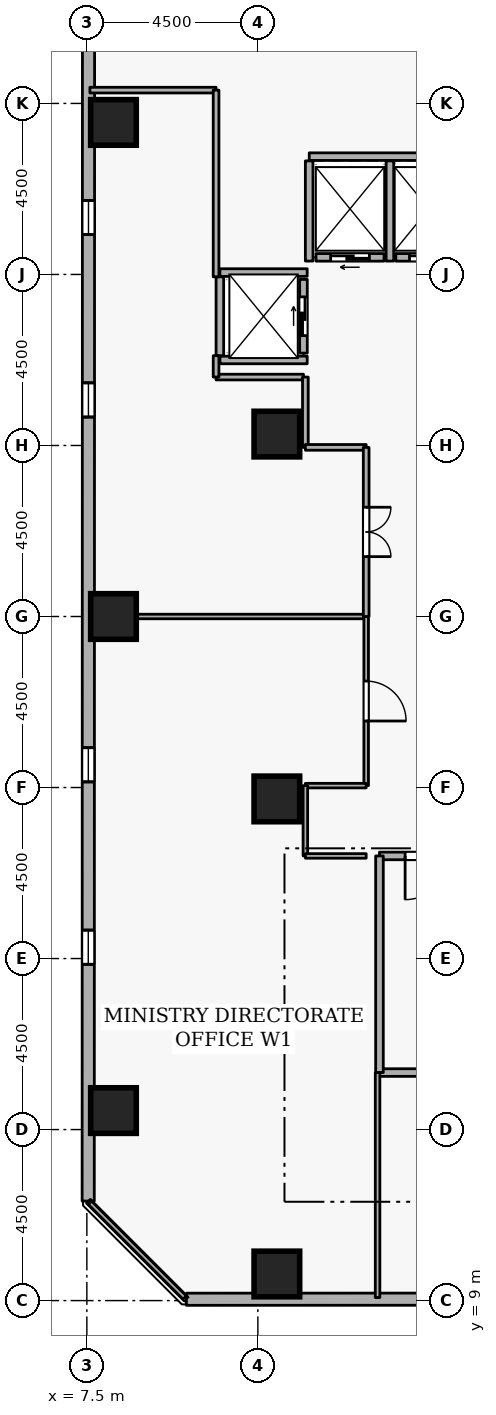
"""IFC4 building model, lengths in metres.
Left out: names, types, materials, properties, quantities, classifications, styles, units other than length and angle.
Written with IfcOpenShell. Run it as: python <this file> out.ifc"""

import sys

from ifc_helpers import new_model, si_unit, direction, frame, frame_2d, origin, origin_2d, place, context, subcontext, project, spatial, rectangle, extrude, element, fill, save


model = new_model("IFC4")
c1 = context("Model", 3, precision=1e-05, world=origin(), true_north=direction((0.0, 1.0)))
c2 = subcontext(c1, "Body", "Model", "MODEL_VIEW")
j1 = project(units=[si_unit("LENGTHUNIT", "METRE"), si_unit("PLANEANGLEUNIT", "RADIAN")], contexts=[c1])
p1 = place(None, origin())
s1 = spatial("IfcSite", under=j1, at=p1, CompositionType="ELEMENT")
p2 = place(p1, origin())
s2 = spatial("IfcBuilding", under=s1, at=p2, CompositionType="ELEMENT")
p3 = place(p2, frame((0.0, 0.0, 83.7)))
s3 = spatial("IfcBuildingStorey", under=s2, at=p3, CompositionType="ELEMENT", Elevation=83.7)
for number, where, z_axis, x_axis in (
    (1, (12.5, 9.7, 0.0), (0.0, 0.0, 1.0), (1.0, 0.0, 0.0)),
    (2, (8.2, 14.0, 0.0), (0.0, 0.0, 1.0), (1.0, 0.0, 0.0)),
    (3, (8.2, 27.0, 0.0), (0.0, 0.0, 1.0), (1.0, 0.0, 0.0)),
    (4, (8.2, 40.0, 0.0), (0.0, 0.0, 1.0), (1.0, 0.0, 0.0)),
    (5, (12.5, 22.2, 0.0), (0.0, 0.0, 1.0), (1.0, 0.0, 0.0)),
    (6, (12.5, 31.8, 0.0), (0.0, 0.0, 1.0), (1.0, 0.0, 0.0)),
):
    element("IfcColumn", number, at=place(p3, frame(where, z_axis=z_axis, x_axis=x_axis)), inside=s3, PredefinedType="COLUMN", context=c2, shape_type="SweptSolid", body=[
        extrude(rectangle(XDim=1.2, YDim=1.2, at=origin_2d()), origin(), (0.0, 0.0, 1.0), 3.6),
    ])
p4 = place(p3, frame((10.119, 9.035, 0.0), z_axis=(0.0, 0.0, 1.0), x_axis=(0.999999960392, 0.000281454314, 0.0)))
e7 = element("IfcWall", 7, at=p4, inside=s3, PredefinedType="STANDARD", context=c2, shape_type="SweptSolid", body=[
    extrude(rectangle(XDim=33.83, YDim=0.32, at=frame_2d((16.915, 0.0))), origin(), (0.0, 0.0, 1.0), 2.7),
])
p5 = place(p4, frame((7.5, 0.0, 0.72)))
e8 = element("IfcOpeningElement", 8, at=p5, cuts=e7, PredefinedType="OPENING", context=c2, shape_type="SweptSolid", body=[
    extrude(rectangle(XDim=0.9, YDim=1.75, at=frame_2d((0.45, 0.875))), frame((0.0, 0.17, 0.0), z_axis=(0.0, -1.0, 0.0), x_axis=(1.0, 0.0, 0.0)), (0.0, 0.0, 1.0), 0.34),
])
p6 = place(p4, frame((12.3, 0.0, 0.72)))
e9 = element("IfcOpeningElement", 9, at=p6, cuts=e7, PredefinedType="OPENING", context=c2, shape_type="SweptSolid", body=[
    extrude(rectangle(XDim=0.9, YDim=1.75, at=frame_2d((0.45, 0.875))), frame((0.0, 0.17, 0.0), z_axis=(0.0, -1.0, 0.0), x_axis=(1.0, 0.0, 0.0)), (0.0, 0.0, 1.0), 0.34),
])
p7 = place(p4, frame((17.1, 0.0, 0.72)))
e10 = element("IfcOpeningElement", 10, at=p7, cuts=e7, PredefinedType="OPENING", context=c2, shape_type="SweptSolid", body=[
    extrude(rectangle(XDim=0.9, YDim=1.75, at=frame_2d((0.45, 0.875))), frame((0.0, 0.17, 0.0), z_axis=(0.0, -1.0, 0.0), x_axis=(1.0, 0.0, 0.0)), (0.0, 0.0, 1.0), 0.34),
])
p8 = place(p4, frame((21.9, 0.0, 0.72)))
e11 = element("IfcOpeningElement", 11, at=p8, cuts=e7, PredefinedType="OPENING", context=c2, shape_type="SweptSolid", body=[
    extrude(rectangle(XDim=0.9, YDim=1.75, at=frame_2d((0.45, 0.875))), frame((0.0, 0.17, 0.0), z_axis=(0.0, -1.0, 0.0), x_axis=(1.0, 0.0, 0.0)), (0.0, 0.0, 1.0), 0.34),
])
p9 = place(p3, frame((7.545, 45.448, 0.0), z_axis=(0.0, 0.0, 1.0), x_axis=(-0.000281454314, -0.999999960392, 0.0)))
e12 = element("IfcWall", 12, at=p9, inside=s3, PredefinedType="STANDARD", context=c2, shape_type="SweptSolid", body=[
    extrude(rectangle(XDim=33.83, YDim=0.32, at=frame_2d((16.915, 0.0))), origin(), (0.0, 0.0, 1.0), 2.7),
])
p10 = place(p9, frame((7.5, 0.0, 0.72)))
e13 = element("IfcOpeningElement", 13, at=p10, cuts=e12, PredefinedType="OPENING", context=c2, shape_type="SweptSolid", body=[
    extrude(rectangle(XDim=0.9, YDim=1.75, at=frame_2d((0.45, 0.875))), frame((0.0, 0.17, 0.0), z_axis=(0.0, -1.0, 0.0), x_axis=(1.0, 0.0, 0.0)), (0.0, 0.0, 1.0), 0.34),
])
p11 = place(p9, frame((12.3, 0.0, 0.72)))
e14 = element("IfcOpeningElement", 14, at=p11, cuts=e12, PredefinedType="OPENING", context=c2, shape_type="SweptSolid", body=[
    extrude(rectangle(XDim=0.9, YDim=1.75, at=frame_2d((0.45, 0.875))), frame((0.0, 0.17, 0.0), z_axis=(0.0, -1.0, 0.0), x_axis=(1.0, 0.0, 0.0)), (0.0, 0.0, 1.0), 0.34),
])
p12 = place(p9, frame((21.9, 0.0, 0.72)))
e15 = element("IfcOpeningElement", 15, at=p12, cuts=e12, PredefinedType="OPENING", context=c2, shape_type="SweptSolid", body=[
    extrude(rectangle(XDim=0.9, YDim=1.75, at=frame_2d((0.45, 0.875))), frame((0.0, 0.17, 0.0), z_axis=(0.0, -1.0, 0.0), x_axis=(1.0, 0.0, 0.0)), (0.0, 0.0, 1.0), 0.34),
])
p13 = place(p9, frame((26.7, 0.0, 0.72)))
e16 = element("IfcOpeningElement", 16, at=p13, cuts=e12, PredefinedType="OPENING", context=c2, shape_type="SweptSolid", body=[
    extrude(rectangle(XDim=0.9, YDim=1.75, at=frame_2d((0.45, 0.875))), frame((0.0, 0.17, 0.0), z_axis=(0.0, -1.0, 0.0), x_axis=(1.0, 0.0, 0.0)), (0.0, 0.0, 1.0), 0.34),
])
p14 = place(p3, frame((17.37, 36.45, 0.0), z_axis=(0.0, 0.0, 1.0), x_axis=(-1.0, 0.0, 0.0)))
e17 = element("IfcWall", 17, at=p14, inside=s3, PredefinedType="STANDARD", context=c2, shape_type="SweptSolid", body=[
    extrude(rectangle(XDim=1.74, YDim=0.2, at=frame_2d((0.87, 0.0))), origin(), (0.0, 0.0, 1.0), 3.34),
])
p15 = place(p14, frame((0.36, 0.0, 0.0)))
e18 = element("IfcOpeningElement", 18, at=p15, cuts=e17, PredefinedType="OPENING", context=c2, shape_type="SweptSolid", body=[
    extrude(rectangle(XDim=1.02, YDim=2.06, at=frame_2d((0.51, 1.03))), frame((0.0, 0.11, 0.0), z_axis=(0.0, -1.0, 0.0), x_axis=(1.0, 0.0, 0.0)), (0.0, 0.0, 1.0), 0.22),
])
p16 = place(p3, frame((15.32, 36.45, 0.0), z_axis=(0.0, 0.0, 1.0), x_axis=(-1.0, 0.0, 0.0)))
e19 = element("IfcWall", 19, at=p16, inside=s3, PredefinedType="STANDARD", context=c2, shape_type="SweptSolid", body=[
    extrude(rectangle(XDim=1.79, YDim=0.2, at=frame_2d((0.895, 0.0))), origin(), (0.0, 0.0, 1.0), 3.34),
])
p17 = place(p16, frame((0.385, 0.0, 0.0)))
e20 = element("IfcOpeningElement", 20, at=p17, cuts=e19, PredefinedType="OPENING", context=c2, shape_type="SweptSolid", body=[
    extrude(rectangle(XDim=1.02, YDim=2.06, at=frame_2d((0.51, 1.03))), frame((0.0, 0.11, 0.0), z_axis=(0.0, -1.0, 0.0), x_axis=(1.0, 0.0, 0.0)), (0.0, 0.0, 1.0), 0.22),
])
p18 = place(p3, frame((13.2, 33.93, 0.0), z_axis=(0.0, 0.0, 1.0), x_axis=(0.0, 1.0, 0.0)))
e21 = element("IfcWall", 21, at=p18, inside=s3, PredefinedType="STANDARD", context=c2, shape_type="SweptSolid", body=[
    extrude(rectangle(XDim=1.94, YDim=0.2, at=frame_2d((0.97, 0.0))), origin(), (0.0, 0.0, 1.0), 3.34),
])
p19 = place(p18, frame((0.46, 0.0, 0.0)))
e22 = element("IfcOpeningElement", 22, at=p19, cuts=e21, PredefinedType="OPENING", context=c2, shape_type="SweptSolid", body=[
    extrude(rectangle(XDim=1.02, YDim=2.06, at=frame_2d((0.51, 1.03))), frame((0.0, 0.11, 0.0), z_axis=(0.0, -1.0, 0.0), x_axis=(1.0, 0.0, 0.0)), (0.0, 0.0, 1.0), 0.22),
])
p20 = place(p3, frame((13.352, 39.1, 0.0), z_axis=(0.0, 0.0, 1.0), x_axis=(1.0, 0.0, 0.0)))
e23 = element("IfcWall", 23, at=p20, inside=s3, PredefinedType="STANDARD", context=c2, shape_type="SweptSolid", body=[
    extrude(rectangle(XDim=4.196, YDim=0.2, at=frame_2d((2.098, 0.0))), origin(), (0.0, 0.0, 1.0), 3.34),
])
for number, where, z_axis, x_axis in (
    (24, (15.475, 36.352, 0.0), (0.0, 0.0, 1.0), (0.0, 1.0, 0.0)),
    (25, (13.35, 36.352, 0.0), (0.0, 0.0, 1.0), (0.0, 1.0, 0.0)),
):
    element("IfcWall", number, at=place(p3, frame(where, z_axis=z_axis, x_axis=x_axis)), inside=s3, PredefinedType="STANDARD", context=c2, shape_type="SweptSolid", body=[
        extrude(rectangle(XDim=2.636, YDim=0.2, at=frame_2d((1.318, 0.0))), origin(), (0.0, 0.0, 1.0), 3.34),
    ])
for number, where, z_axis, x_axis in (
    (26, (11.002, 36.05, 0.0), (0.0, 0.0, 1.0), (1.0, 0.0, 0.0)),
    (27, (11.002, 33.75, 0.0), (0.0, 0.0, 1.0), (1.0, 0.0, 0.0)),
):
    element("IfcWall", number, at=place(p3, frame(where, z_axis=z_axis, x_axis=x_axis)), inside=s3, PredefinedType="STANDARD", context=c2, shape_type="SweptSolid", body=[
        extrude(rectangle(XDim=2.296, YDim=0.2, at=frame_2d((1.148, 0.0))), origin(), (0.0, 0.0, 1.0), 3.34),
    ])
p21 = place(p3, frame((11.0, 33.862, 0.0), z_axis=(0.0, 0.0, 1.0), x_axis=(0.0, 1.0, 0.0)))
e28 = element("IfcWall", 28, at=p21, inside=s3, PredefinedType="STANDARD", context=c2, shape_type="SweptSolid", body=[
    extrude(rectangle(XDim=2.076, YDim=0.2, at=frame_2d((1.038, 0.0))), origin(), (0.0, 0.0, 1.0), 3.34),
])
p22 = place(p3, frame((15.2, 15.0, 0.0), z_axis=(0.0, 0.0, 1.0), x_axis=(1.0, 0.0, 0.0)))
e29 = element("IfcWall", 29, at=p22, inside=s3, PredefinedType="STANDARD", context=c2, shape_type="SweptSolid", body=[
    extrude(rectangle(XDim=2.5, YDim=0.2, at=frame_2d((1.25, 0.0))), origin(), (0.0, 0.0, 1.0), 3.34),
])
p23 = place(p3, frame((17.7, 20.7, 0.0), z_axis=(0.0, 0.0, 1.0), x_axis=(-1.0, 0.0, 0.0)))
e30 = element("IfcWall", 30, at=p23, inside=s3, PredefinedType="STANDARD", context=c2, shape_type="SweptSolid", body=[
    extrude(rectangle(XDim=2.5, YDim=0.2, at=frame_2d((1.25, 0.0))), origin(), (0.0, 0.0, 1.0), 3.34),
])
p24 = place(p23, frame((0.675, 0.0, 0.0)))
e31 = element("IfcOpeningElement", 31, at=p24, cuts=e30, PredefinedType="OPENING", context=c2, shape_type="SweptSolid", body=[
    extrude(rectangle(XDim=1.15, YDim=2.1, at=frame_2d((0.575, 1.05))), frame((0.0, 0.11, 0.0), z_axis=(0.0, -1.0, 0.0), x_axis=(1.0, 0.0, 0.0)), (0.0, 0.0, 1.0), 0.22),
])
p25 = place(p3, frame((15.2, 20.7, 0.0), z_axis=(0.0, 0.0, 1.0), x_axis=(0.0, -1.0, 0.0)))
e32 = element("IfcWall", 32, at=p25, inside=s3, PredefinedType="STANDARD", context=c2, shape_type="SweptSolid", body=[
    extrude(rectangle(XDim=5.7, YDim=0.2, at=frame_2d((2.85, 0.0))), origin(), (0.0, 0.0, 1.0), 3.34),
])
p26 = place(p3, frame((7.58, 27.0, 0.0), z_axis=(0.0, 0.0, 1.0), x_axis=(1.0, 0.0, 0.0)))
e33 = element("IfcWall", 33, at=p26, inside=s3, PredefinedType="PARTITIONING", context=c2, shape_type="SweptSolid", body=[
    extrude(rectangle(XDim=7.27, YDim=0.12, at=frame_2d((3.635, 0.0))), origin(), (0.0, 0.0, 1.0), 2.882),
])
p27 = place(p3, frame((14.85, 27.0, 0.0), z_axis=(0.0, 0.0, 1.0), x_axis=(0.0, -1.0, 0.0)))
e34 = element("IfcWall", 34, at=p27, inside=s3, PredefinedType="PARTITIONING", context=c2, shape_type="SweptSolid", body=[
    extrude(rectangle(XDim=4.45, YDim=0.12, at=frame_2d((2.225, 0.0))), origin(), (0.0, 0.0, 1.0), 3.34),
])
p28 = place(p27, frame((1.7, 0.0, 0.0)))
e35 = element("IfcOpeningElement", 35, at=p28, cuts=e34, PredefinedType="OPENING", context=c2, shape_type="SweptSolid", body=[
    extrude(rectangle(XDim=1.05, YDim=2.1, at=frame_2d((0.525, 1.05))), frame((0.0, 0.07, 0.0), z_axis=(0.0, -1.0, 0.0), x_axis=(1.0, 0.0, 0.0)), (0.0, 0.0, 1.0), 0.14),
])
p29 = place(p3, frame((14.85, 22.55, 0.0), z_axis=(0.0, 0.0, 1.0), x_axis=(-1.0, 0.0, 0.0)))
e36 = element("IfcWall", 36, at=p29, inside=s3, PredefinedType="PARTITIONING", context=c2, shape_type="SweptSolid", body=[
    extrude(rectangle(XDim=1.6, YDim=0.12, at=frame_2d((0.8, 0.0))), origin(), (0.0, 0.0, 1.0), 3.34),
])
p30 = place(p3, frame((13.25, 22.55, 0.0), z_axis=(0.0, 0.0, 1.0), x_axis=(0.0, -1.0, 0.0)))
e37 = element("IfcWall", 37, at=p30, inside=s3, PredefinedType="PARTITIONING", context=c2, shape_type="SweptSolid", body=[
    extrude(rectangle(XDim=1.85, YDim=0.12, at=frame_2d((0.925, 0.0))), origin(), (0.0, 0.0, 1.0), 3.34),
])
p31 = place(p3, frame((13.25, 20.7, 0.0), z_axis=(0.0, 0.0, 1.0), x_axis=(1.0, 0.0, 0.0)))
e38 = element("IfcWall", 38, at=p31, inside=s3, PredefinedType="PARTITIONING", context=c2, shape_type="SweptSolid", body=[
    extrude(rectangle(XDim=1.6, YDim=0.12, at=frame_2d((0.8, 0.0))), origin(), (0.0, 0.0, 1.0), 3.34),
])
p32 = place(p3, frame((15.15, 15.0, 0.0), z_axis=(0.0, 0.0, 1.0), x_axis=(0.0, -1.0, 0.0)))
e39 = element("IfcWall", 39, at=p32, inside=s3, PredefinedType="PARTITIONING", context=c2, shape_type="SweptSolid", body=[
    extrude(rectangle(XDim=5.92, YDim=0.12, at=frame_2d((2.96, 0.0))), origin(), (0.0, 0.0, 1.0), 3.34),
])
p33 = place(p3, frame((10.075, 9.08, 0.0), z_axis=(0.0, 0.0, 1.0), x_axis=(-0.707106781187, 0.707106781187, 0.0)))
e40 = element("IfcWall", 40, at=p33, inside=s3, PredefinedType="PARTITIONING", context=c2, shape_type="SweptSolid", body=[
    extrude(rectangle(XDim=3.528, YDim=0.12, at=frame_2d((1.764, 0.0))), origin(), (0.0, 0.0, 1.0), 3.34),
])
p34 = place(p3, frame((10.9, 33.3, 0.0), z_axis=(0.0, 0.0, 1.0), x_axis=(1.0, 0.0, 0.0)))
e41 = element("IfcWall", 41, at=p34, inside=s3, PredefinedType="PARTITIONING", context=c2, shape_type="SweptSolid", body=[
    extrude(rectangle(XDim=2.3, YDim=0.15, at=frame_2d((1.15, 0.0))), origin(), (0.0, 0.0, 1.0), 3.34),
])
p35 = place(p3, frame((13.25, 33.3, 0.0), z_axis=(0.0, 0.0, 1.0), x_axis=(0.0, -1.0, 0.0)))
e42 = element("IfcWall", 42, at=p35, inside=s3, PredefinedType="PARTITIONING", context=c2, shape_type="SweptSolid", body=[
    extrude(rectangle(XDim=1.85, YDim=0.15, at=frame_2d((0.925, 0.0))), origin(), (0.0, 0.0, 1.0), 3.34),
])
p36 = place(p3, frame((13.25, 31.45, 0.0), z_axis=(0.0, 0.0, 1.0), x_axis=(1.0, 0.0, 0.0)))
e43 = element("IfcWall", 43, at=p36, inside=s3, PredefinedType="PARTITIONING", context=c2, shape_type="SweptSolid", body=[
    extrude(rectangle(XDim=1.6, YDim=0.15, at=frame_2d((0.8, 0.0))), origin(), (0.0, 0.0, 1.0), 3.34),
])
p37 = place(p3, frame((14.85, 31.45, 0.0), z_axis=(0.0, 0.0, 1.0), x_axis=(0.0, -1.0, 0.0)))
e44 = element("IfcWall", 44, at=p37, inside=s3, PredefinedType="PARTITIONING", context=c2, shape_type="SweptSolid", body=[
    extrude(rectangle(XDim=4.45, YDim=0.15, at=frame_2d((2.225, 0.0))), origin(), (0.0, 0.0, 1.0), 3.34),
])
p38 = place(p37, frame((1.575, 0.0, 0.0)))
e45 = element("IfcOpeningElement", 45, at=p38, cuts=e44, PredefinedType="OPENING", context=c2, shape_type="SweptSolid", body=[
    extrude(rectangle(XDim=1.3, YDim=2.12, at=frame_2d((0.65, 1.06))), frame((0.0, 0.085, 0.0), z_axis=(0.0, -1.0, 0.0), x_axis=(1.0, 0.0, 0.0)), (0.0, 0.0, 1.0), 0.17),
])
p39 = place(p3, frame((7.58, 40.85, 0.0), z_axis=(0.0, 0.0, 1.0), x_axis=(1.0, 0.0, 0.0)))
e46 = element("IfcWall", 46, at=p39, inside=s3, PredefinedType="PARTITIONING", context=c2, shape_type="SweptSolid", body=[
    extrude(rectangle(XDim=3.32, YDim=0.15, at=frame_2d((1.66, 0.0))), origin(), (0.0, 0.0, 1.0), 3.34),
])
p40 = place(p3, frame((10.9, 40.85, 0.0), z_axis=(0.0, 0.0, 1.0), x_axis=(0.0, -1.0, 0.0)))
e47 = element("IfcWall", 47, at=p40, inside=s3, PredefinedType="PARTITIONING", context=c2, shape_type="SweptSolid", body=[
    extrude(rectangle(XDim=4.912, YDim=0.15, at=frame_2d((2.456, 0.0))), origin(), (0.0, 0.0, 1.0), 3.34),
])
p41 = place(p3, frame((10.9, 33.862, 0.0), z_axis=(0.0, 0.0, 1.0), x_axis=(0.0, -1.0, 0.0)))
e48 = element("IfcWall", 48, at=p41, inside=s3, PredefinedType="PARTITIONING", context=c2, shape_type="SweptSolid", body=[
    extrude(rectangle(XDim=0.562, YDim=0.15, at=frame_2d((0.281, 0.0))), origin(), (0.0, 0.0, 1.0), 3.34),
])
p42 = place(p10, origin())
e49 = element("IfcWindow", 49, at=p42, inside=s3, PartitioningType="SINGLE_PANEL", PredefinedType="WINDOW", context=c2, shape_type="SweptSolid", body=[
    extrude(rectangle(XDim=0.9, YDim=1.75, at=frame_2d((0.45, 0.875))), frame((0.0, 0.03, 0.0), z_axis=(0.0, -1.0, 0.0), x_axis=(1.0, 0.0, 0.0)), (0.0, 0.0, 1.0), 0.06),
])
fill(e13, e49)
p43 = place(p11, origin())
e50 = element("IfcWindow", 50, at=p43, inside=s3, PartitioningType="SINGLE_PANEL", PredefinedType="WINDOW", context=c2, shape_type="SweptSolid", body=[
    extrude(rectangle(XDim=0.9, YDim=1.75, at=frame_2d((0.45, 0.875))), frame((0.0, 0.03, 0.0), z_axis=(0.0, -1.0, 0.0), x_axis=(1.0, 0.0, 0.0)), (0.0, 0.0, 1.0), 0.06),
])
fill(e14, e50)
p44 = place(p12, origin())
e51 = element("IfcWindow", 51, at=p44, inside=s3, PartitioningType="SINGLE_PANEL", PredefinedType="WINDOW", context=c2, shape_type="SweptSolid", body=[
    extrude(rectangle(XDim=0.9, YDim=1.75, at=frame_2d((0.45, 0.875))), frame((0.0, 0.03, 0.0), z_axis=(0.0, -1.0, 0.0), x_axis=(1.0, 0.0, 0.0)), (0.0, 0.0, 1.0), 0.06),
])
fill(e15, e51)
p45 = place(p13, origin())
e52 = element("IfcWindow", 52, at=p45, inside=s3, PartitioningType="SINGLE_PANEL", PredefinedType="WINDOW", context=c2, shape_type="SweptSolid", body=[
    extrude(rectangle(XDim=0.9, YDim=1.75, at=frame_2d((0.45, 0.875))), frame((0.0, 0.03, 0.0), z_axis=(0.0, -1.0, 0.0), x_axis=(1.0, 0.0, 0.0)), (0.0, 0.0, 1.0), 0.06),
])
fill(e16, e52)
p46 = place(p15, origin())
e53 = element("IfcDoor", 53, at=p46, inside=s3, OperationType="SLIDING_TO_LEFT", PredefinedType="DOOR", context=c2, shape_type="SweptSolid", body=[
    extrude(rectangle(XDim=1.02, YDim=2.06, at=frame_2d((0.51, 1.03))), frame((0.0, 0.025, 0.0), z_axis=(0.0, -1.0, 0.0), x_axis=(1.0, 0.0, 0.0)), (0.0, 0.0, 1.0), 0.05),
])
fill(e18, e53)
p47 = place(p17, origin())
e54 = element("IfcDoor", 54, at=p47, inside=s3, OperationType="SLIDING_TO_LEFT", PredefinedType="DOOR", context=c2, shape_type="SweptSolid", body=[
    extrude(rectangle(XDim=1.02, YDim=2.06, at=frame_2d((0.51, 1.03))), frame((0.0, 0.025, 0.0), z_axis=(0.0, -1.0, 0.0), x_axis=(1.0, 0.0, 0.0)), (0.0, 0.0, 1.0), 0.05),
])
fill(e20, e54)
p48 = place(p19, origin())
e55 = element("IfcDoor", 55, at=p48, inside=s3, OperationType="SLIDING_TO_LEFT", PredefinedType="DOOR", context=c2, shape_type="SweptSolid", body=[
    extrude(rectangle(XDim=1.02, YDim=2.06, at=frame_2d((0.51, 1.03))), frame((0.0, 0.025, 0.0), z_axis=(0.0, -1.0, 0.0), x_axis=(1.0, 0.0, 0.0)), (0.0, 0.0, 1.0), 0.05),
])
fill(e22, e55)
p49 = place(p24, origin())
e56 = element("IfcDoor", 56, at=p49, inside=s3, OperationType="SINGLE_SWING_RIGHT", PredefinedType="DOOR", context=c2, shape_type="SweptSolid", body=[
    extrude(rectangle(XDim=1.15, YDim=2.1, at=frame_2d((0.575, 1.05))), frame((0.0, 0.025, 0.0), z_axis=(0.0, -1.0, 0.0), x_axis=(1.0, 0.0, 0.0)), (0.0, 0.0, 1.0), 0.05),
])
fill(e31, e56)
p50 = place(p28, origin())
e57 = element("IfcDoor", 57, at=p50, inside=s3, OperationType="SINGLE_SWING_RIGHT", PredefinedType="DOOR", context=c2, shape_type="SweptSolid", body=[
    extrude(rectangle(XDim=1.05, YDim=2.1, at=frame_2d((0.525, 1.05))), frame((0.0, 0.025, 0.0), z_axis=(0.0, -1.0, 0.0), x_axis=(1.0, 0.0, 0.0)), (0.0, 0.0, 1.0), 0.05),
])
fill(e35, e57)
p51 = place(p38, origin())
e58 = element("IfcDoor", 58, at=p51, inside=s3, OperationType="DOUBLE_DOOR_SINGLE_SWING", PredefinedType="DOOR", context=c2, shape_type="SweptSolid", body=[
    extrude(rectangle(XDim=1.3, YDim=2.12, at=frame_2d((0.65, 1.06))), frame((0.0, 0.025, 0.0), z_axis=(0.0, -1.0, 0.0), x_axis=(1.0, 0.0, 0.0)), (0.0, 0.0, 1.0), 0.05),
])
fill(e45, e58)
save(model, sys.argv[1])
